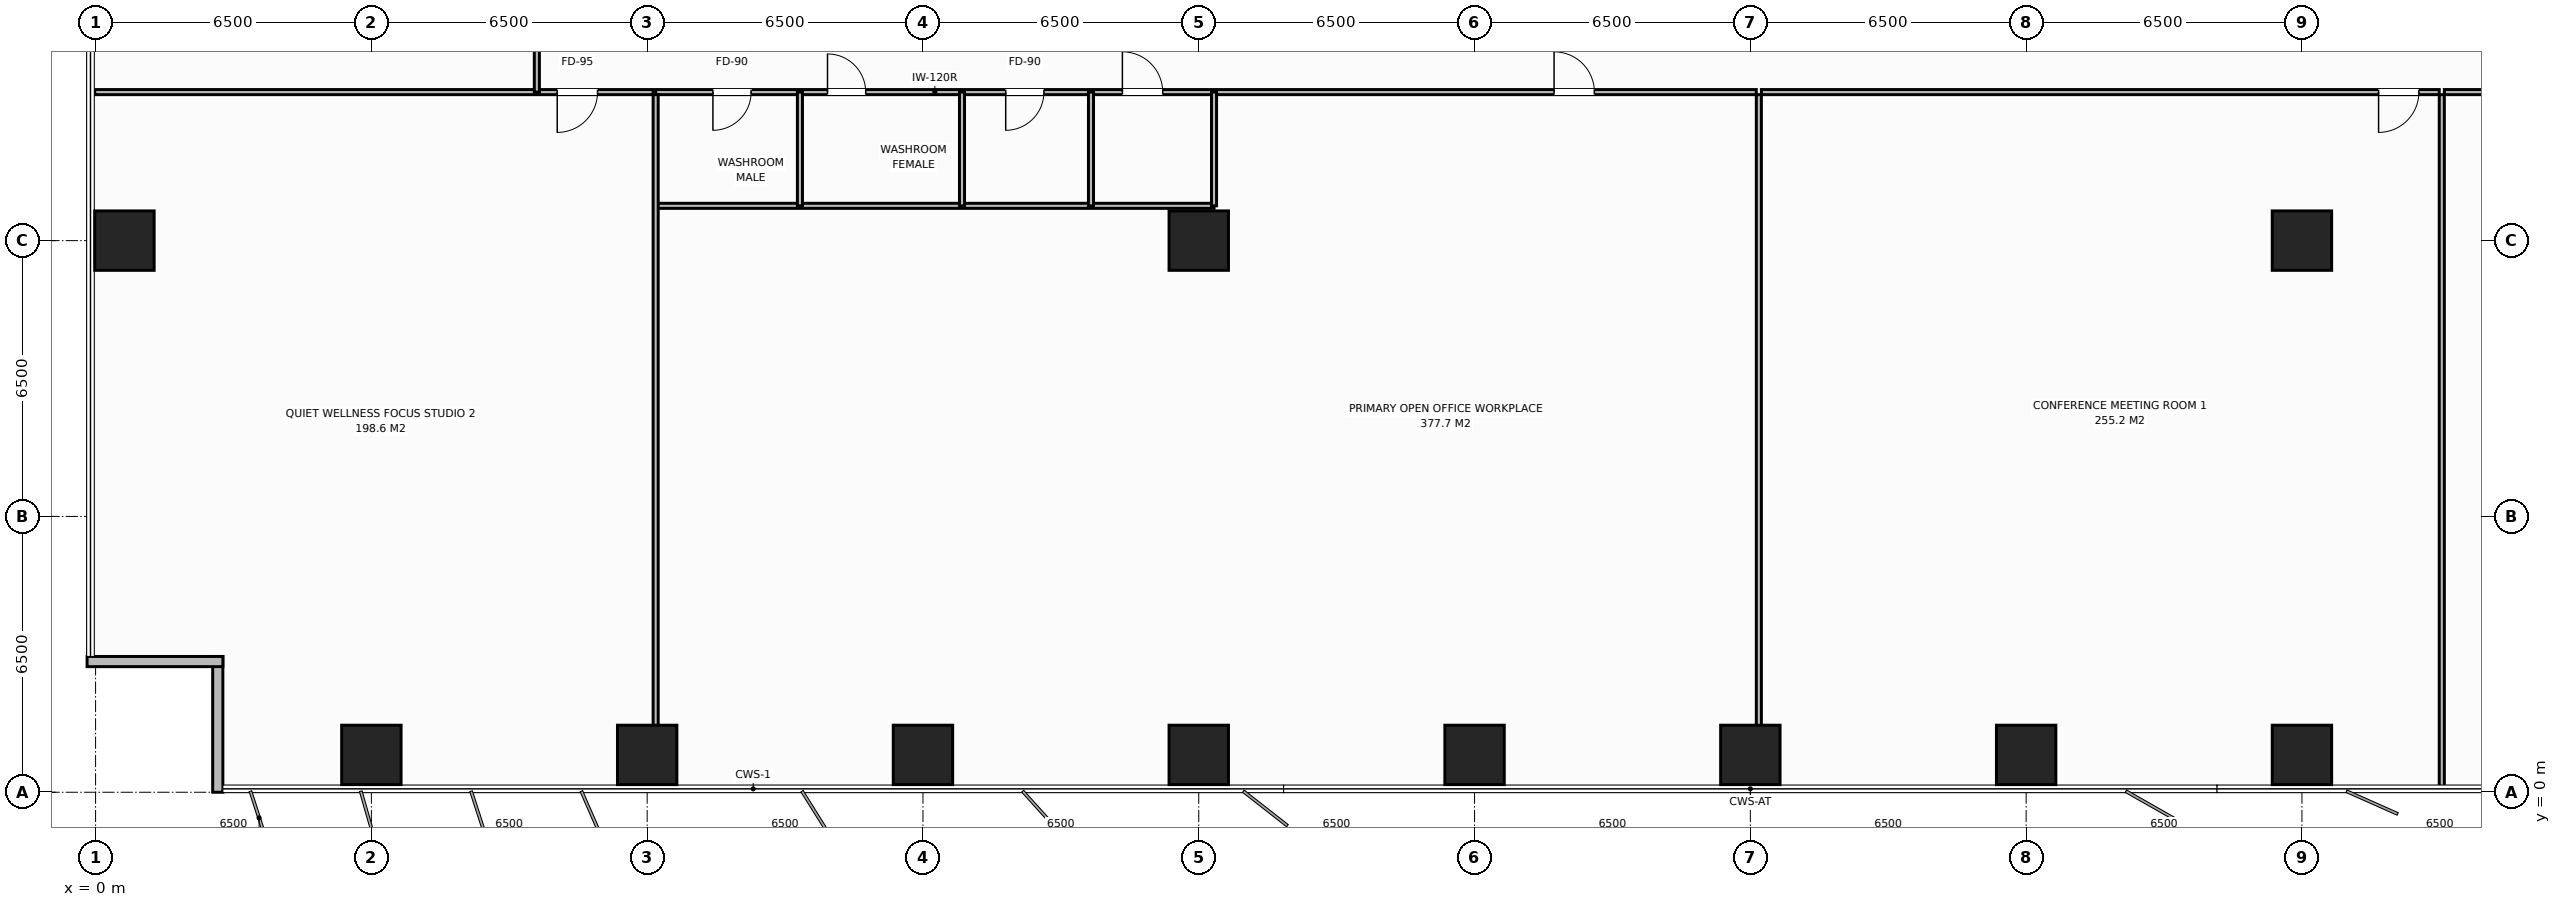
"""IFC4 building model, lengths in metres.
Left out: names, types, materials, properties, quantities, classifications, styles, units other than length and angle.
Written with IfcOpenShell. Run it as: python <this file> out.ifc"""

import sys

from ifc_helpers import new_model, si_unit, direction, frame, frame_2d, origin, origin_2d, place, context, subcontext, project, spatial, rectangle, extrude, element, fill, save


model = new_model("IFC4")
c1 = context("Model", 3, precision=1e-05, world=origin(), true_north=direction((0.0, 1.0)))
c2 = subcontext(c1, "Body", "Model", "MODEL_VIEW")
j1 = project(units=[si_unit("LENGTHUNIT", "METRE"), si_unit("PLANEANGLEUNIT", "RADIAN")], contexts=[c1])
p1 = place(None, origin())
s1 = spatial("IfcSite", under=j1, at=p1, CompositionType="ELEMENT")
p2 = place(p1, origin())
s2 = spatial("IfcBuilding", under=s1, at=p2, CompositionType="ELEMENT")
p3 = place(p2, frame((0.0, 0.0, 43.0)))
s3 = spatial("IfcBuildingStorey", under=s2, at=p3, CompositionType="ELEMENT", Elevation=43.0)
for number, where, z_axis, x_axis in (
    (1, (26.0, 13.0, 0.0), (0.0, 0.0, 1.0), (1.0, 0.0, 0.0)),
    (2, (52.0, 13.0, 0.0), (0.0, 0.0, 1.0), (1.0, 0.0, 0.0)),
    (3, (6.5, 0.88, 0.0), (0.0, 0.0, 1.0), (1.0, 0.0, 0.0)),
    (4, (13.0, 0.88, 0.0), (0.0, 0.0, 1.0), (1.0, 0.0, 0.0)),
    (5, (19.5, 0.88, 0.0), (0.0, 0.0, 1.0), (1.0, 0.0, 0.0)),
    (6, (26.0, 0.88, 0.0), (0.0, 0.0, 1.0), (1.0, 0.0, 0.0)),
    (7, (32.5, 0.88, 0.0), (0.0, 0.0, 1.0), (1.0, 0.0, 0.0)),
    (8, (39.0, 0.88, 0.0), (0.0, 0.0, 1.0), (1.0, 0.0, 0.0)),
    (9, (45.5, 0.88, 0.0), (0.0, 0.0, 1.0), (1.0, 0.0, 0.0)),
    (10, (52.0, 0.88, 0.0), (0.0, 0.0, 1.0), (1.0, 0.0, 0.0)),
    (11, (0.68, 13.0, 0.0), (0.0, 0.0, 1.0), (1.0, 0.0, 0.0)),
):
    element("IfcColumn", number, at=place(p3, frame(where, z_axis=z_axis, x_axis=x_axis)), inside=s3, PredefinedType="COLUMN", context=c2, shape_type="SweptSolid", body=[
        extrude(rectangle(XDim=1.4, YDim=1.4, at=origin_2d()), origin(), (0.0, 0.0, 1.0), 3.8),
    ])
for number, where, z_axis, x_axis in (
    (12, (2.88, 0.0, 0.0), (0.0, 0.0, 1.0), (0.0, 1.0, 0.0)),
    (13, (3.0, 3.08, 0.0), (0.0, 0.0, 1.0), (-1.0, 0.0, 0.0)),
):
    element("IfcWall", number, at=place(p3, frame(where, z_axis=z_axis, x_axis=x_axis)), inside=s3, PredefinedType="STANDARD", context=c2, shape_type="SweptSolid", body=[
        extrude(rectangle(XDim=3.2, YDim=0.24, at=frame_2d((1.6, 0.0))), origin(), (0.0, 0.0, 1.0), 3.55),
    ])
p4 = place(p3, frame((13.2, 16.5, 0.0), z_axis=(0.0, 0.0, 1.0), x_axis=(1.0, 0.0, 0.0)))
e14 = element("IfcWall", 14, at=p4, inside=s3, PredefinedType="PARTITIONING", context=c2, shape_type="SweptSolid", body=[
    extrude(rectangle(XDim=13.16, YDim=0.12, at=frame_2d((6.58, 0.0))), origin(), (0.0, 0.0, 1.0), 3.55),
])
p5 = place(p4, frame((1.35, 0.0, 0.0)))
e15 = element("IfcOpeningElement", 15, at=p5, cuts=e14, PredefinedType="OPENING", context=c2, shape_type="SweptSolid", body=[
    extrude(rectangle(XDim=0.9, YDim=2.15, at=frame_2d((0.45, 1.075))), frame((0.0, 0.07, 0.0), z_axis=(0.0, -1.0, 0.0), x_axis=(1.0, 0.0, 0.0)), (0.0, 0.0, 1.0), 0.14),
])
p6 = place(p4, frame((4.05, 0.0, 0.0)))
e16 = element("IfcOpeningElement", 16, at=p6, cuts=e14, PredefinedType="OPENING", context=c2, shape_type="SweptSolid", body=[
    extrude(rectangle(XDim=0.9, YDim=2.15, at=frame_2d((0.45, 1.075))), frame((0.0, 0.07, 0.0), z_axis=(0.0, -1.0, 0.0), x_axis=(1.0, 0.0, 0.0)), (0.0, 0.0, 1.0), 0.14),
])
p7 = place(p4, frame((8.25, 0.0, 0.0)))
e17 = element("IfcOpeningElement", 17, at=p7, cuts=e14, PredefinedType="OPENING", context=c2, shape_type="SweptSolid", body=[
    extrude(rectangle(XDim=0.9, YDim=2.15, at=frame_2d((0.45, 1.075))), frame((0.0, 0.07, 0.0), z_axis=(0.0, -1.0, 0.0), x_axis=(1.0, 0.0, 0.0)), (0.0, 0.0, 1.0), 0.14),
])
p8 = place(p4, frame((11.0, 0.0, 0.0)))
e18 = element("IfcOpeningElement", 18, at=p8, cuts=e14, PredefinedType="OPENING", context=c2, shape_type="SweptSolid", body=[
    extrude(rectangle(XDim=0.95, YDim=2.15, at=frame_2d((0.475, 1.075))), frame((0.0, 0.07, 0.0), z_axis=(0.0, -1.0, 0.0), x_axis=(1.0, 0.0, 0.0)), (0.0, 0.0, 1.0), 0.14),
])
p9 = place(p3, frame((13.2, 13.82, 0.0), z_axis=(0.0, 0.0, 1.0), x_axis=(1.0, 0.0, 0.0)))
e19 = element("IfcWall", 19, at=p9, inside=s3, PredefinedType="PARTITIONING", context=c2, shape_type="SweptSolid", body=[
    extrude(rectangle(XDim=13.16, YDim=0.12, at=frame_2d((6.58, 0.0))), origin(), (0.0, 0.0, 1.0), 3.55),
])
for number, where, z_axis, x_axis in (
    (20, (16.6, 13.82, 0.0), (0.0, 0.0, 1.0), (0.0, 1.0, 0.0)),
    (21, (20.42, 13.82, 0.0), (0.0, 0.0, 1.0), (0.0, 1.0, 0.0)),
    (22, (23.46, 13.82, 0.0), (0.0, 0.0, 1.0), (0.0, 1.0, 0.0)),
    (23, (26.36, 13.82, 0.0), (0.0, 0.0, 1.0), (0.0, 1.0, 0.0)),
):
    element("IfcWall", number, at=place(p3, frame(where, z_axis=z_axis, x_axis=x_axis)), inside=s3, PredefinedType="PARTITIONING", context=c2, shape_type="SweptSolid", body=[
        extrude(rectangle(XDim=2.68, YDim=0.12, at=frame_2d((1.34, 0.0))), origin(), (0.0, 0.0, 1.0), 3.55),
    ])
p10 = place(p3, frame((13.2, 0.02, 0.0), z_axis=(0.0, 0.0, 1.0), x_axis=(0.0, 1.0, 0.0)))
e24 = element("IfcWall", 24, at=p10, inside=s3, PredefinedType="PARTITIONING", context=c2, shape_type="SweptSolid", body=[
    extrude(rectangle(XDim=16.42, YDim=0.12, at=frame_2d((8.21, 0.0))), origin(), (0.0, 0.0, 1.0), 2.9),
])
p11 = place(p3, frame((-0.02, 16.5, 0.0), z_axis=(0.0, 0.0, 1.0), x_axis=(1.0, 0.0, 0.0)))
e25 = element("IfcWall", 25, at=p11, inside=s3, PredefinedType="PARTITIONING", context=c2, shape_type="SweptSolid", body=[
    extrude(rectangle(XDim=13.16, YDim=0.12, at=frame_2d((6.58, 0.0))), origin(), (0.0, 0.0, 1.0), 3.55),
])
p12 = place(p11, frame((10.9, 0.0, 0.0)))
e26 = element("IfcOpeningElement", 26, at=p12, cuts=e25, PredefinedType="OPENING", context=c2, shape_type="SweptSolid", body=[
    extrude(rectangle(XDim=0.95, YDim=2.15, at=frame_2d((0.475, 1.075))), frame((0.0, 0.07, 0.0), z_axis=(0.0, -1.0, 0.0), x_axis=(1.0, 0.0, 0.0)), (0.0, 0.0, 1.0), 0.14),
])
p13 = place(p3, frame((39.2, 0.02, 0.0), z_axis=(0.0, 0.0, 1.0), x_axis=(0.0, 1.0, 0.0)))
e27 = element("IfcWall", 27, at=p13, inside=s3, PredefinedType="PARTITIONING", context=c2, shape_type="SweptSolid", body=[
    extrude(rectangle(XDim=16.42, YDim=0.12, at=frame_2d((8.21, 0.0))), origin(), (0.0, 0.0, 1.0), 2.9),
])
p14 = place(p3, frame((26.42, 16.5, 0.0), z_axis=(0.0, 0.0, 1.0), x_axis=(1.0, 0.0, 0.0)))
e28 = element("IfcWall", 28, at=p14, inside=s3, PredefinedType="PARTITIONING", context=c2, shape_type="SweptSolid", body=[
    extrude(rectangle(XDim=12.72, YDim=0.12, at=frame_2d((6.36, 0.0))), origin(), (0.0, 0.0, 1.0), 3.55),
])
p15 = place(p14, frame((7.954, 0.0, 0.0)))
e29 = element("IfcOpeningElement", 29, at=p15, cuts=e28, PredefinedType="OPENING", context=c2, shape_type="SweptSolid", body=[
    extrude(rectangle(XDim=0.95, YDim=2.15, at=frame_2d((0.475, 1.075))), frame((0.0, 0.07, 0.0), z_axis=(0.0, -1.0, 0.0), x_axis=(1.0, 0.0, 0.0)), (0.0, 0.0, 1.0), 0.14),
])
p16 = place(p3, frame((55.296, 0.02, 0.0), z_axis=(0.0, 0.0, 1.0), x_axis=(0.0, 1.0, 0.0)))
e30 = element("IfcWall", 30, at=p16, inside=s3, PredefinedType="PARTITIONING", context=c2, shape_type="SweptSolid", body=[
    extrude(rectangle(XDim=16.42, YDim=0.12, at=frame_2d((8.21, 0.0))), origin(), (0.0, 0.0, 1.0), 3.55),
])
p17 = place(p3, frame((39.26, 16.5, 0.0), z_axis=(0.0, 0.0, 1.0), x_axis=(1.0, 0.0, 0.0)))
e31 = element("IfcWall", 31, at=p17, inside=s3, PredefinedType="PARTITIONING", context=c2, shape_type="SweptSolid", body=[
    extrude(rectangle(XDim=15.976, YDim=0.12, at=frame_2d((7.988, 0.0))), origin(), (0.0, 0.0, 1.0), 3.55),
])
p18 = place(p17, frame((14.546, 0.0, 0.0)))
e32 = element("IfcOpeningElement", 32, at=p18, cuts=e31, PredefinedType="OPENING", context=c2, shape_type="SweptSolid", body=[
    extrude(rectangle(XDim=0.95, YDim=2.15, at=frame_2d((0.475, 1.075))), frame((0.0, 0.07, 0.0), z_axis=(0.0, -1.0, 0.0), x_axis=(1.0, 0.0, 0.0)), (0.0, 0.0, 1.0), 0.14),
])
p19 = place(p3, frame((55.356, 16.5, 0.0), z_axis=(0.0, 0.0, 1.0), x_axis=(1.0, 0.0, 0.0)))
e33 = element("IfcWall", 33, at=p19, inside=s3, PredefinedType="PARTITIONING", context=c2, shape_type="SweptSolid", body=[
    extrude(rectangle(XDim=22.664, YDim=0.12, at=frame_2d((11.332, 0.0))), origin(), (0.0, 0.0, 1.0), 3.55),
])
p20 = place(p19, frame((5.647, 0.0, 0.0)))
e34 = element("IfcOpeningElement", 34, at=p20, cuts=e33, PredefinedType="OPENING", context=c2, shape_type="SweptSolid", body=[
    extrude(rectangle(XDim=0.95, YDim=2.15, at=frame_2d((0.475, 1.075))), frame((0.0, 0.07, 0.0), z_axis=(0.0, -1.0, 0.0), x_axis=(1.0, 0.0, 0.0)), (0.0, 0.0, 1.0), 0.14),
])
p21 = place(p3, frame((10.4, 16.5, 0.0), z_axis=(0.0, 0.0, 1.0), x_axis=(0.0, 1.0, 0.0)))
e35 = element("IfcWall", 35, at=p21, inside=s3, PredefinedType="PARTITIONING", context=c2, shape_type="SweptSolid", body=[
    extrude(rectangle(XDim=9.5, YDim=0.12, at=frame_2d((4.75, 0.0))), origin(), (0.0, 0.0, 1.0), 3.55),
])
p22 = place(p21, frame((5.325, 0.0, 0.0)))
e36 = element("IfcOpeningElement", 36, at=p22, cuts=e35, PredefinedType="OPENING", context=c2, shape_type="SweptSolid", body=[
    extrude(rectangle(XDim=0.95, YDim=2.15, at=frame_2d((0.475, 1.075))), frame((0.0, 0.07, 0.0), z_axis=(0.0, -1.0, 0.0), x_axis=(1.0, 0.0, 0.0)), (0.0, 0.0, 1.0), 0.14),
])
p23 = place(p5, origin())
e37 = element("IfcDoor", 37, at=p23, inside=s3, OperationType="SINGLE_SWING_RIGHT", PredefinedType="DOOR", context=c2, shape_type="SweptSolid", body=[
    extrude(rectangle(XDim=0.9, YDim=2.15, at=frame_2d((0.45, 1.075))), frame((0.0, 0.025, 0.0), z_axis=(0.0, -1.0, 0.0), x_axis=(1.0, 0.0, 0.0)), (0.0, 0.0, 1.0), 0.05),
])
fill(e15, e37)
p24 = place(p6, origin())
e38 = element("IfcDoor", 38, at=p24, inside=s3, OperationType="SINGLE_SWING_LEFT", PredefinedType="DOOR", context=c2, shape_type="SweptSolid", body=[
    extrude(rectangle(XDim=0.9, YDim=2.15, at=frame_2d((0.45, 1.075))), frame((0.0, 0.025, 0.0), z_axis=(0.0, -1.0, 0.0), x_axis=(1.0, 0.0, 0.0)), (0.0, 0.0, 1.0), 0.05),
])
fill(e16, e38)
p25 = place(p7, origin())
e39 = element("IfcDoor", 39, at=p25, inside=s3, OperationType="SINGLE_SWING_RIGHT", PredefinedType="DOOR", context=c2, shape_type="SweptSolid", body=[
    extrude(rectangle(XDim=0.9, YDim=2.15, at=frame_2d((0.45, 1.075))), frame((0.0, 0.025, 0.0), z_axis=(0.0, -1.0, 0.0), x_axis=(1.0, 0.0, 0.0)), (0.0, 0.0, 1.0), 0.05),
])
fill(e17, e39)
p26 = place(p8, origin())
e40 = element("IfcDoor", 40, at=p26, inside=s3, OperationType="SINGLE_SWING_LEFT", PredefinedType="DOOR", context=c2, shape_type="SweptSolid", body=[
    extrude(rectangle(XDim=0.95, YDim=2.15, at=frame_2d((0.475, 1.075))), frame((0.0, 0.025, 0.0), z_axis=(0.0, -1.0, 0.0), x_axis=(1.0, 0.0, 0.0)), (0.0, 0.0, 1.0), 0.05),
])
fill(e18, e40)
p27 = place(p12, origin())
e41 = element("IfcDoor", 41, at=p27, inside=s3, OperationType="SINGLE_SWING_RIGHT", PredefinedType="DOOR", context=c2, shape_type="SweptSolid", body=[
    extrude(rectangle(XDim=0.95, YDim=2.15, at=frame_2d((0.475, 1.075))), frame((0.0, 0.025, 0.0), z_axis=(0.0, -1.0, 0.0), x_axis=(1.0, 0.0, 0.0)), (0.0, 0.0, 1.0), 0.05),
])
fill(e26, e41)
p28 = place(p15, origin())
e42 = element("IfcDoor", 42, at=p28, inside=s3, OperationType="SINGLE_SWING_LEFT", PredefinedType="DOOR", context=c2, shape_type="SweptSolid", body=[
    extrude(rectangle(XDim=0.95, YDim=2.15, at=frame_2d((0.475, 1.075))), frame((0.0, 0.025, 0.0), z_axis=(0.0, -1.0, 0.0), x_axis=(1.0, 0.0, 0.0)), (0.0, 0.0, 1.0), 0.05),
])
fill(e29, e42)
p29 = place(p18, origin())
e43 = element("IfcDoor", 43, at=p29, inside=s3, OperationType="SINGLE_SWING_RIGHT", PredefinedType="DOOR", context=c2, shape_type="SweptSolid", body=[
    extrude(rectangle(XDim=0.95, YDim=2.15, at=frame_2d((0.475, 1.075))), frame((0.0, 0.025, 0.0), z_axis=(0.0, -1.0, 0.0), x_axis=(1.0, 0.0, 0.0)), (0.0, 0.0, 1.0), 0.05),
])
fill(e32, e43)
save(model, sys.argv[1])
